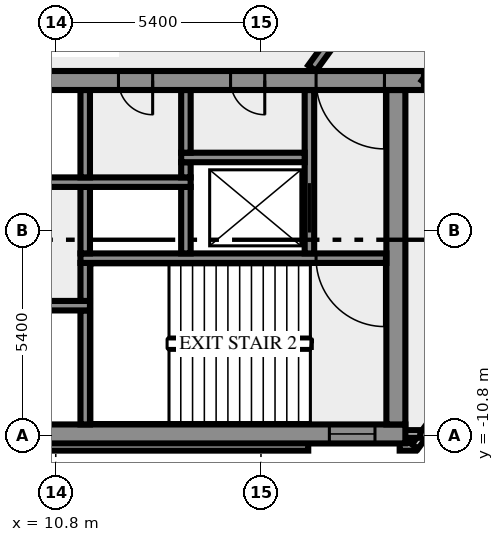
"""IFC4 building model, lengths in metres.
Left out: names, types, materials, properties, quantities, classifications, styles, units other than length and angle.
Written with IfcOpenShell. Run it as: python <this file> out.ifc"""

import sys

from ifc_helpers import new_model, si_unit, direction, frame, frame_2d, origin, place, context, subcontext, project, spatial, rectangle, extrude, element, fill, save


model = new_model("IFC4")
c1 = context("Model", 3, precision=1e-05, world=origin(), true_north=direction((0.0, 1.0)))
c2 = subcontext(c1, "Body", "Model", "MODEL_VIEW")
j1 = project(units=[si_unit("LENGTHUNIT", "METRE"), si_unit("PLANEANGLEUNIT", "RADIAN")], contexts=[c1])
p1 = place(None, origin())
s1 = spatial("IfcSite", under=j1, at=p1, CompositionType="ELEMENT")
p2 = place(p1, origin())
s2 = spatial("IfcBuilding", under=s1, at=p2, CompositionType="ELEMENT")
p3 = place(p2, frame((0.0, 0.0, 39.0)))
s3 = spatial("IfcBuildingStorey", under=s2, at=p3, CompositionType="ELEMENT", Elevation=39.0)
p4 = place(p3, frame((-17.444, -11.088, 0.0), z_axis=(0.0, 0.0, 1.0), x_axis=(1.0, 0.0, 0.0)))
e1 = element("IfcWall", 1, at=p4, inside=s3, PredefinedType="SOLIDWALL", context=c2, shape_type="SweptSolid", body=[
    extrude(rectangle(XDim=34.888, YDim=0.2, at=frame_2d((17.444, 0.0))), origin(), (0.0, 0.0, 1.0), 3.65),
])
p5 = place(p3, frame((19.85, -11.088, 0.0), z_axis=(0.0, 0.0, 1.0), x_axis=(1.0, 0.0, 0.0)))
e2 = element("IfcWall", 2, at=p5, inside=s3, PredefinedType="SOLIDWALL", context=c2, shape_type="SweptSolid", body=[
    extrude(rectangle(XDim=0.406, YDim=0.2, at=frame_2d((0.203, 0.0))), origin(), (0.0, 0.0, 1.0), 3.65),
])
p6 = place(p3, frame((20.253, -11.083, 0.0), z_axis=(0.0, 0.0, 1.0), x_axis=(0.587766567315, 0.809030569476, 0.0)))
e3 = element("IfcWall", 3, at=p6, inside=s3, PredefinedType="SOLIDWALL", context=c2, shape_type="SweptSolid", body=[
    extrude(rectangle(XDim=2.688, YDim=0.2, at=frame_2d((1.344, 0.0))), origin(), (0.0, 0.0, 1.0), 3.65),
])
p7 = place(p3, frame((19.98, -10.75, 0.0), z_axis=(0.0, 0.0, 1.0), x_axis=(1.0, 0.0, 0.0)))
e4 = element("IfcWall", 4, at=p7, inside=s3, PredefinedType="SOLIDWALL", context=c2, shape_type="SweptSolid", body=[
    extrude(rectangle(XDim=0.417, YDim=0.2, at=frame_2d((0.208, 0.0))), origin(), (0.0, 0.0, 1.0), 3.65),
])
p8 = place(p3, frame((-20.0, -10.75, 0.0), z_axis=(0.0, 0.0, 1.0), x_axis=(1.0, 0.0, 0.0)))
e5 = element("IfcWall", 5, at=p8, inside=s3, PredefinedType="SHEAR", context=c2, shape_type="SweptSolid", body=[
    extrude(rectangle(XDim=40.0, YDim=0.5, at=frame_2d((20.0, 0.0))), origin(), (0.0, 0.0, 1.0), 3.65),
])
p9 = place(p8, frame((0.8, 0.0, 1.0)))
e6 = element("IfcOpeningElement", 6, at=p9, cuts=e5, PredefinedType="OPENING", context=c2, shape_type="SweptSolid", body=[
    extrude(rectangle(XDim=1.2, YDim=1.2, at=frame_2d((0.6, 0.6))), frame((0.0, 0.26, 0.0), z_axis=(0.0, -1.0, 0.0), x_axis=(1.0, 0.0, 0.0)), (0.0, 0.0, 1.0), 0.52),
])
p10 = place(p8, frame((38.0, 0.0, 1.0)))
e7 = element("IfcOpeningElement", 7, at=p10, cuts=e5, PredefinedType="OPENING", context=c2, shape_type="SweptSolid", body=[
    extrude(rectangle(XDim=1.2, YDim=1.2, at=frame_2d((0.6, 0.6))), frame((0.0, 0.26, 0.0), z_axis=(0.0, -1.0, 0.0), x_axis=(1.0, 0.0, 0.0)), (0.0, 0.0, 1.0), 0.52),
])
p11 = place(p3, frame((11.575, -10.5, 0.0), z_axis=(0.0, 0.0, 1.0), x_axis=(0.0, 1.0, 0.0)))
e8 = element("IfcWall", 8, at=p11, inside=s3, PredefinedType="SHEAR", context=c2, shape_type="SweptSolid", body=[
    extrude(rectangle(XDim=3.0, YDim=0.25, at=frame_2d((1.5, 0.0))), origin(), (0.0, 0.0, 1.0), 3.65),
])
p12 = place(p3, frame((19.75, -10.5, 0.0), z_axis=(0.0, 0.0, 1.0), x_axis=(0.0, 1.0, 0.0)))
e9 = element("IfcWall", 9, at=p12, inside=s3, PredefinedType="SHEAR", context=c2, shape_type="SweptSolid", body=[
    extrude(rectangle(XDim=8.8, YDim=0.5, at=frame_2d((4.4, 0.0))), origin(), (0.0, 0.0, 1.0), 3.65),
])
p13 = place(p3, frame((11.7, -7.375, 0.0), z_axis=(0.0, 0.0, 1.0), x_axis=(-1.0, 0.0, 0.0)))
e10 = element("IfcWall", 10, at=p13, inside=s3, PredefinedType="SHEAR", context=c2, shape_type="SweptSolid", body=[
    extrude(rectangle(XDim=23.4, YDim=0.25, at=frame_2d((11.7, 0.0))), origin(), (0.0, 0.0, 1.0), 3.65),
])
p14 = place(p13, frame((21.45, 0.0, 0.0)))
e11 = element("IfcOpeningElement", 11, at=p14, cuts=e10, PredefinedType="OPENING", context=c2, shape_type="SweptSolid", body=[
    extrude(rectangle(XDim=1.1, YDim=2.1, at=frame_2d((0.55, 1.05))), frame((0.0, 0.135, 0.0), z_axis=(0.0, -1.0, 0.0), x_axis=(1.0, 0.0, 0.0)), (0.0, 0.0, 1.0), 0.27),
])
p15 = place(p13, frame((18.95, 0.0, 0.0)))
e12 = element("IfcOpeningElement", 12, at=p15, cuts=e10, PredefinedType="OPENING", context=c2, shape_type="SweptSolid", body=[
    extrude(rectangle(XDim=1.1, YDim=2.1, at=frame_2d((0.55, 1.05))), frame((0.0, 0.135, 0.0), z_axis=(0.0, -1.0, 0.0), x_axis=(1.0, 0.0, 0.0)), (0.0, 0.0, 1.0), 0.27),
])
p16 = place(p13, frame((16.45, 0.0, 0.0)))
e13 = element("IfcOpeningElement", 13, at=p16, cuts=e10, PredefinedType="OPENING", context=c2, shape_type="SweptSolid", body=[
    extrude(rectangle(XDim=1.1, YDim=2.1, at=frame_2d((0.55, 1.05))), frame((0.0, 0.135, 0.0), z_axis=(0.0, -1.0, 0.0), x_axis=(1.0, 0.0, 0.0)), (0.0, 0.0, 1.0), 0.27),
])
p17 = place(p13, frame((14.4, 0.0, 0.0)))
e14 = element("IfcOpeningElement", 14, at=p17, cuts=e10, PredefinedType="OPENING", context=c2, shape_type="SweptSolid", body=[
    extrude(rectangle(XDim=0.9, YDim=2.1, at=frame_2d((0.45, 1.05))), frame((0.0, 0.135, 0.0), z_axis=(0.0, -1.0, 0.0), x_axis=(1.0, 0.0, 0.0)), (0.0, 0.0, 1.0), 0.27),
])
p18 = place(p13, frame((12.5, 0.0, 0.0)))
e15 = element("IfcOpeningElement", 15, at=p18, cuts=e10, PredefinedType="OPENING", context=c2, shape_type="SweptSolid", body=[
    extrude(rectangle(XDim=0.9, YDim=2.1, at=frame_2d((0.45, 1.05))), frame((0.0, 0.135, 0.0), z_axis=(0.0, -1.0, 0.0), x_axis=(1.0, 0.0, 0.0)), (0.0, 0.0, 1.0), 0.27),
])
p19 = place(p13, frame((10.6, 0.0, 0.0)))
e16 = element("IfcOpeningElement", 16, at=p19, cuts=e10, PredefinedType="OPENING", context=c2, shape_type="SweptSolid", body=[
    extrude(rectangle(XDim=0.9, YDim=2.1, at=frame_2d((0.45, 1.05))), frame((0.0, 0.135, 0.0), z_axis=(0.0, -1.0, 0.0), x_axis=(1.0, 0.0, 0.0)), (0.0, 0.0, 1.0), 0.27),
])
p20 = place(p3, frame((11.575, -7.25, 0.0), z_axis=(0.0, 0.0, 1.0), x_axis=(0.0, 1.0, 0.0)))
e17 = element("IfcWall", 17, at=p20, inside=s3, PredefinedType="SHEAR", context=c2, shape_type="SweptSolid", body=[
    extrude(rectangle(XDim=1.0, YDim=0.25, at=frame_2d((0.5, 0.0))), origin(), (0.0, 0.0, 1.0), 3.65),
])
p21 = place(p3, frame((19.5, -6.125, 0.0), z_axis=(0.0, 0.0, 1.0), x_axis=(-1.0, 0.0, 0.0)))
e18 = element("IfcWall", 18, at=p21, inside=s3, PredefinedType="SHEAR", context=c2, shape_type="SweptSolid", body=[
    extrude(rectangle(XDim=8.05, YDim=0.25, at=frame_2d((4.025, 0.0))), origin(), (0.0, 0.0, 1.0), 3.65),
])
p22 = place(p21, frame((0.05, 0.0, 0.0)))
e19 = element("IfcOpeningElement", 19, at=p22, cuts=e18, PredefinedType="OPENING", context=c2, shape_type="SweptSolid", body=[
    extrude(rectangle(XDim=1.8, YDim=2.1, at=frame_2d((0.9, 1.05))), frame((0.0, 0.135, 0.0), z_axis=(0.0, -1.0, 0.0), x_axis=(1.0, 0.0, 0.0)), (0.0, 0.0, 1.0), 0.27),
])
for number, where, z_axis, x_axis in (
    (20, (11.575, -6.0, 0.0), (0.0, 0.0, 1.0), (0.0, 1.0, 0.0)),
    (21, (14.225, -6.0, 0.0), (0.0, 0.0, 1.0), (0.0, 1.0, 0.0)),
):
    element("IfcWall", number, at=place(p3, frame(where, z_axis=z_axis, x_axis=x_axis)), inside=s3, PredefinedType="SHEAR", context=c2, shape_type="SweptSolid", body=[
        extrude(rectangle(XDim=1.75, YDim=0.25, at=frame_2d((0.875, 0.0))), origin(), (0.0, 0.0, 1.0), 3.65),
    ])
p23 = place(p3, frame((17.475, -6.0, 0.0), z_axis=(0.0, 0.0, 1.0), x_axis=(0.0, 1.0, 0.0)))
e22 = element("IfcWall", 22, at=p23, inside=s3, PredefinedType="SHEAR", context=c2, shape_type="SweptSolid", body=[
    extrude(rectangle(XDim=4.3, YDim=0.25, at=frame_2d((2.15, 0.0))), origin(), (0.0, 0.0, 1.0), 3.65),
])
p24 = place(p23, frame((0.55, 0.0, 0.0)))
e23 = element("IfcOpeningElement", 23, at=p24, cuts=e22, PredefinedType="OPENING", context=c2, shape_type="SweptSolid", body=[
    extrude(rectangle(XDim=1.3, YDim=2.1, at=frame_2d((0.65, 1.05))), frame((0.0, 0.135, 0.0), z_axis=(0.0, -1.0, 0.0), x_axis=(1.0, 0.0, 0.0)), (0.0, 0.0, 1.0), 0.27),
])
p25 = place(p3, frame((-0.6, -4.125, 0.0), z_axis=(0.0, 0.0, 1.0), x_axis=(1.0, 0.0, 0.0)))
e24 = element("IfcWall", 24, at=p25, inside=s3, PredefinedType="SHEAR", context=c2, shape_type="SweptSolid", body=[
    extrude(rectangle(XDim=14.95, YDim=0.25, at=frame_2d((7.475, 0.0))), origin(), (0.0, 0.0, 1.0), 3.65),
])
p26 = place(p25, frame((2.75, 0.0, 0.0)))
e25 = element("IfcOpeningElement", 25, at=p26, cuts=e24, PredefinedType="OPENING", context=c2, shape_type="SweptSolid", body=[
    extrude(rectangle(XDim=1.3, YDim=2.1, at=frame_2d((0.65, 1.05))), frame((0.0, 0.135, 0.0), z_axis=(0.0, -1.0, 0.0), x_axis=(1.0, 0.0, 0.0)), (0.0, 0.0, 1.0), 0.27),
])
p27 = place(p3, frame((11.575, -4.0, 0.0), z_axis=(0.0, 0.0, 1.0), x_axis=(0.0, 1.0, 0.0)))
e26 = element("IfcWall", 26, at=p27, inside=s3, PredefinedType="SHEAR", context=c2, shape_type="SweptSolid", body=[
    extrude(rectangle(XDim=2.3, YDim=0.25, at=frame_2d((1.15, 0.0))), origin(), (0.0, 0.0, 1.0), 3.65),
])
p28 = place(p3, frame((14.225, -4.0, 0.0), z_axis=(0.0, 0.0, 1.0), x_axis=(0.0, 1.0, 0.0)))
e27 = element("IfcWall", 27, at=p28, inside=s3, PredefinedType="SHEAR", context=c2, shape_type="SweptSolid", body=[
    extrude(rectangle(XDim=0.4, YDim=0.25, at=frame_2d((0.2, 0.0))), origin(), (0.0, 0.0, 1.0), 3.65),
])
p29 = place(p3, frame((14.1, -3.475, 0.0), z_axis=(0.0, 0.0, 1.0), x_axis=(1.0, 0.0, 0.0)))
e28 = element("IfcWall", 28, at=p29, inside=s3, PredefinedType="SHEAR", context=c2, shape_type="SweptSolid", body=[
    extrude(rectangle(XDim=3.25, YDim=0.25, at=frame_2d((1.625, 0.0))), origin(), (0.0, 0.0, 1.0), 3.65),
])
p30 = place(p3, frame((14.225, -3.35, 0.0), z_axis=(0.0, 0.0, 1.0), x_axis=(0.0, 1.0, 0.0)))
e29 = element("IfcWall", 29, at=p30, inside=s3, PredefinedType="SHEAR", context=c2, shape_type="SweptSolid", body=[
    extrude(rectangle(XDim=1.65, YDim=0.25, at=frame_2d((0.825, 0.0))), origin(), (0.0, 0.0, 1.0), 3.65),
])
p31 = place(p3, frame((20.49, -1.45, 0.0), z_axis=(0.0, 0.0, 1.0), x_axis=(-1.0, 0.0, 0.0)))
e30 = element("IfcWall", 30, at=p31, inside=s3, PredefinedType="SHEAR", context=c2, shape_type="SweptSolid", body=[
    extrude(rectangle(XDim=40.98, YDim=0.5, at=frame_2d((20.49, 0.0))), origin(), (0.0, 0.0, 1.0), 3.65),
])
p32 = place(p31, frame((38.14, 0.0, 0.0)))
e31 = element("IfcOpeningElement", 31, at=p32, cuts=e30, PredefinedType="OPENING", context=c2, shape_type="SweptSolid", body=[
    extrude(rectangle(XDim=1.8, YDim=2.1, at=frame_2d((0.9, 1.05))), frame((0.0, 0.26, 0.0), z_axis=(0.0, -1.0, 0.0), x_axis=(1.0, 0.0, 0.0)), (0.0, 0.0, 1.0), 0.52),
])
p33 = place(p31, frame((36.728, 0.0, 0.0)))
e32 = element("IfcOpeningElement", 32, at=p33, cuts=e30, PredefinedType="OPENING", context=c2, shape_type="SweptSolid", body=[
    extrude(rectangle(XDim=0.8, YDim=2.1, at=frame_2d((0.4, 1.05))), frame((0.0, 0.26, 0.0), z_axis=(0.0, -1.0, 0.0), x_axis=(1.0, 0.0, 0.0)), (0.0, 0.0, 1.0), 0.52),
])
p34 = place(p31, frame((35.153, 0.0, 0.0)))
e33 = element("IfcOpeningElement", 33, at=p34, cuts=e30, PredefinedType="OPENING", context=c2, shape_type="SweptSolid", body=[
    extrude(rectangle(XDim=0.8, YDim=2.1, at=frame_2d((0.4, 1.05))), frame((0.0, 0.26, 0.0), z_axis=(0.0, -1.0, 0.0), x_axis=(1.0, 0.0, 0.0)), (0.0, 0.0, 1.0), 0.52),
])
p35 = place(p31, frame((32.94, 0.0, 0.0)))
e34 = element("IfcOpeningElement", 34, at=p35, cuts=e30, PredefinedType="OPENING", context=c2, shape_type="SweptSolid", body=[
    extrude(rectangle(XDim=0.9, YDim=2.1, at=frame_2d((0.45, 1.05))), frame((0.0, 0.26, 0.0), z_axis=(0.0, -1.0, 0.0), x_axis=(1.0, 0.0, 0.0)), (0.0, 0.0, 1.0), 0.52),
])
p36 = place(p31, frame((21.765, 0.0, 0.0)))
e35 = element("IfcOpeningElement", 35, at=p36, cuts=e30, PredefinedType="OPENING", context=c2, shape_type="SweptSolid", body=[
    extrude(rectangle(XDim=2.0, YDim=2.1, at=frame_2d((1.0, 1.05))), frame((0.0, 0.26, 0.0), z_axis=(0.0, -1.0, 0.0), x_axis=(1.0, 0.0, 0.0)), (0.0, 0.0, 1.0), 0.52),
])
p37 = place(p31, frame((7.14, 0.0, 0.0)))
e36 = element("IfcOpeningElement", 36, at=p37, cuts=e30, PredefinedType="OPENING", context=c2, shape_type="SweptSolid", body=[
    extrude(rectangle(XDim=0.9, YDim=2.1, at=frame_2d((0.45, 1.05))), frame((0.0, 0.26, 0.0), z_axis=(0.0, -1.0, 0.0), x_axis=(1.0, 0.0, 0.0)), (0.0, 0.0, 1.0), 0.52),
])
p38 = place(p31, frame((4.19, 0.0, 0.0)))
e37 = element("IfcOpeningElement", 37, at=p38, cuts=e30, PredefinedType="OPENING", context=c2, shape_type="SweptSolid", body=[
    extrude(rectangle(XDim=0.9, YDim=2.1, at=frame_2d((0.45, 1.05))), frame((0.0, 0.26, 0.0), z_axis=(0.0, -1.0, 0.0), x_axis=(1.0, 0.0, 0.0)), (0.0, 0.0, 1.0), 0.52),
])
p39 = place(p31, frame((1.04, 0.0, 0.0)))
e38 = element("IfcOpeningElement", 38, at=p39, cuts=e30, PredefinedType="OPENING", context=c2, shape_type="SweptSolid", body=[
    extrude(rectangle(XDim=1.8, YDim=2.1, at=frame_2d((0.9, 1.05))), frame((0.0, 0.26, 0.0), z_axis=(0.0, -1.0, 0.0), x_axis=(1.0, 0.0, 0.0)), (0.0, 0.0, 1.0), 0.52),
])
p40 = place(p3, frame((17.545, -1.125, 0.0), z_axis=(0.0, 0.0, 1.0), x_axis=(0.587786323093, 0.809016216391, 0.0)))
e39 = element("IfcWall", 39, at=p40, inside=s3, PredefinedType="SOLIDWALL", context=c2, shape_type="SweptSolid", body=[
    extrude(rectangle(XDim=33.493, YDim=0.25, at=frame_2d((16.747, 0.0))), origin(), (0.0, 0.0, 1.0), 3.65),
])
p41 = place(p40, frame((25.857, 0.0, 0.0)))
e40 = element("IfcOpeningElement", 40, at=p41, cuts=e39, PredefinedType="OPENING", context=c2, shape_type="SweptSolid", body=[
    extrude(rectangle(XDim=0.9, YDim=2.1, at=frame_2d((0.45, 1.05))), frame((0.0, 0.135, 0.0), z_axis=(0.0, -1.0, 0.0), x_axis=(1.0, 0.0, 0.0)), (0.0, 0.0, 1.0), 0.27),
])
p42 = place(p40, frame((24.157, 0.0, 0.0)))
e41 = element("IfcOpeningElement", 41, at=p42, cuts=e39, PredefinedType="OPENING", context=c2, shape_type="SweptSolid", body=[
    extrude(rectangle(XDim=1.0, YDim=2.1, at=frame_2d((0.5, 1.05))), frame((0.0, 0.135, 0.0), z_axis=(0.0, -1.0, 0.0), x_axis=(1.0, 0.0, 0.0)), (0.0, 0.0, 1.0), 0.27),
])
p43 = place(p3, frame((43.467, 30.045, 0.0), z_axis=(0.0, 0.0, 1.0), x_axis=(-0.587784726077, -0.809017376692, 0.0)))
e42 = element("IfcWall", 42, at=p43, inside=s3, PredefinedType="SOLIDWALL", context=c2, shape_type="SweptSolid", body=[
    extrude(rectangle(XDim=39.02, YDim=0.25, at=frame_2d((19.51, 0.0))), origin(), (0.0, 0.0, 1.0), 3.65),
])
p44 = place(p43, frame((37.588, 0.0, 0.0)))
e43 = element("IfcOpeningElement", 43, at=p44, cuts=e42, PredefinedType="OPENING", context=c2, shape_type="SweptSolid", body=[
    extrude(rectangle(XDim=0.9, YDim=2.1, at=frame_2d((0.45, 1.05))), frame((0.0, 0.135, 0.0), z_axis=(0.0, -1.0, 0.0), x_axis=(1.0, 0.0, 0.0)), (0.0, 0.0, 1.0), 0.27),
])
p45 = place(p43, frame((20.855, 0.0, 0.0)))
e44 = element("IfcOpeningElement", 44, at=p45, cuts=e42, PredefinedType="OPENING", context=c2, shape_type="SweptSolid", body=[
    extrude(rectangle(XDim=0.9, YDim=2.1, at=frame_2d((0.45, 1.05))), frame((0.0, 0.135, 0.0), z_axis=(0.0, -1.0, 0.0), x_axis=(1.0, 0.0, 0.0)), (0.0, 0.0, 1.0), 0.27),
])
p46 = place(p43, frame((7.355, 0.0, 0.0)))
e45 = element("IfcOpeningElement", 45, at=p46, cuts=e42, PredefinedType="OPENING", context=c2, shape_type="SweptSolid", body=[
    extrude(rectangle(XDim=0.9, YDim=2.1, at=frame_2d((0.45, 1.05))), frame((0.0, 0.135, 0.0), z_axis=(0.0, -1.0, 0.0), x_axis=(1.0, 0.0, 0.0)), (0.0, 0.0, 1.0), 0.27),
])
p47 = place(p43, frame((11.404, 0.0, 0.0)))
e46 = element("IfcOpeningElement", 46, at=p47, cuts=e42, PredefinedType="OPENING", context=c2, shape_type="SweptSolid", body=[
    extrude(rectangle(XDim=0.9, YDim=2.1, at=frame_2d((0.45, 1.05))), frame((0.0, 0.135, 0.0), z_axis=(0.0, -1.0, 0.0), x_axis=(1.0, 0.0, 0.0)), (0.0, 0.0, 1.0), 0.27),
])
p48 = place(p43, frame((0.604, 0.0, 0.0)))
e47 = element("IfcOpeningElement", 47, at=p48, cuts=e42, PredefinedType="OPENING", context=c2, shape_type="SweptSolid", body=[
    extrude(rectangle(XDim=0.9, YDim=2.1, at=frame_2d((0.45, 1.05))), frame((0.0, 0.135, 0.0), z_axis=(0.0, -1.0, 0.0), x_axis=(1.0, 0.0, 0.0)), (0.0, 0.0, 1.0), 0.27),
])
p49 = place(p43, frame((22.455, 0.0, 0.0)))
e48 = element("IfcOpeningElement", 48, at=p49, cuts=e42, PredefinedType="OPENING", context=c2, shape_type="SweptSolid", body=[
    extrude(rectangle(XDim=0.9, YDim=2.1, at=frame_2d((0.45, 1.05))), frame((0.0, 0.135, 0.0), z_axis=(0.0, -1.0, 0.0), x_axis=(1.0, 0.0, 0.0)), (0.0, 0.0, 1.0), 0.27),
])
p50 = place(p10, origin())
e49 = element("IfcWindow", 49, at=p50, inside=s3, PartitioningType="SINGLE_PANEL", PredefinedType="WINDOW", context=c2, shape_type="SweptSolid", body=[
    extrude(rectangle(XDim=1.2, YDim=1.2, at=frame_2d((0.6, 0.6))), frame((0.0, 0.03, 0.0), z_axis=(0.0, -1.0, 0.0), x_axis=(1.0, 0.0, 0.0)), (0.0, 0.0, 1.0), 0.06),
])
fill(e7, e49)
p51 = place(p22, origin())
e50 = element("IfcDoor", 50, at=p51, inside=s3, OperationType="DOUBLE_DOOR_SINGLE_SWING", PredefinedType="DOOR", context=c2, shape_type="SweptSolid", body=[
    extrude(rectangle(XDim=1.8, YDim=2.1, at=frame_2d((0.9, 1.05))), frame((0.0, 0.025, 0.0), z_axis=(0.0, -1.0, 0.0), x_axis=(1.0, 0.0, 0.0)), (0.0, 0.0, 1.0), 0.05),
])
fill(e19, e50)
p52 = place(p24, origin())
e51 = element("IfcDoor", 51, at=p52, inside=s3, OperationType="DOUBLE_DOOR_SLIDING", PredefinedType="DOOR", context=c2, shape_type="SweptSolid", body=[
    extrude(rectangle(XDim=1.3, YDim=2.1, at=frame_2d((0.65, 1.05))), frame((0.0, 0.025, 0.0), z_axis=(0.0, -1.0, 0.0), x_axis=(1.0, 0.0, 0.0)), (0.0, 0.0, 1.0), 0.05),
])
fill(e23, e51)
p53 = place(p37, origin())
e52 = element("IfcDoor", 52, at=p53, inside=s3, OperationType="SINGLE_SWING_LEFT", PredefinedType="DOOR", context=c2, shape_type="SweptSolid", body=[
    extrude(rectangle(XDim=0.9, YDim=2.1, at=frame_2d((0.45, 1.05))), frame((0.0, 0.025, 0.0), z_axis=(0.0, -1.0, 0.0), x_axis=(1.0, 0.0, 0.0)), (0.0, 0.0, 1.0), 0.05),
])
fill(e36, e52)
p54 = place(p38, origin())
e53 = element("IfcDoor", 53, at=p54, inside=s3, OperationType="SINGLE_SWING_LEFT", PredefinedType="DOOR", context=c2, shape_type="SweptSolid", body=[
    extrude(rectangle(XDim=0.9, YDim=2.1, at=frame_2d((0.45, 1.05))), frame((0.0, 0.025, 0.0), z_axis=(0.0, -1.0, 0.0), x_axis=(1.0, 0.0, 0.0)), (0.0, 0.0, 1.0), 0.05),
])
fill(e37, e53)
p55 = place(p39, origin())
e54 = element("IfcDoor", 54, at=p55, inside=s3, OperationType="DOUBLE_DOOR_SINGLE_SWING", PredefinedType="DOOR", context=c2, shape_type="SweptSolid", body=[
    extrude(rectangle(XDim=1.8, YDim=2.1, at=frame_2d((0.9, 1.05))), frame((0.0, 0.025, 0.0), z_axis=(0.0, -1.0, 0.0), x_axis=(1.0, 0.0, 0.0)), (0.0, 0.0, 1.0), 0.05),
])
fill(e38, e54)
save(model, sys.argv[1])
